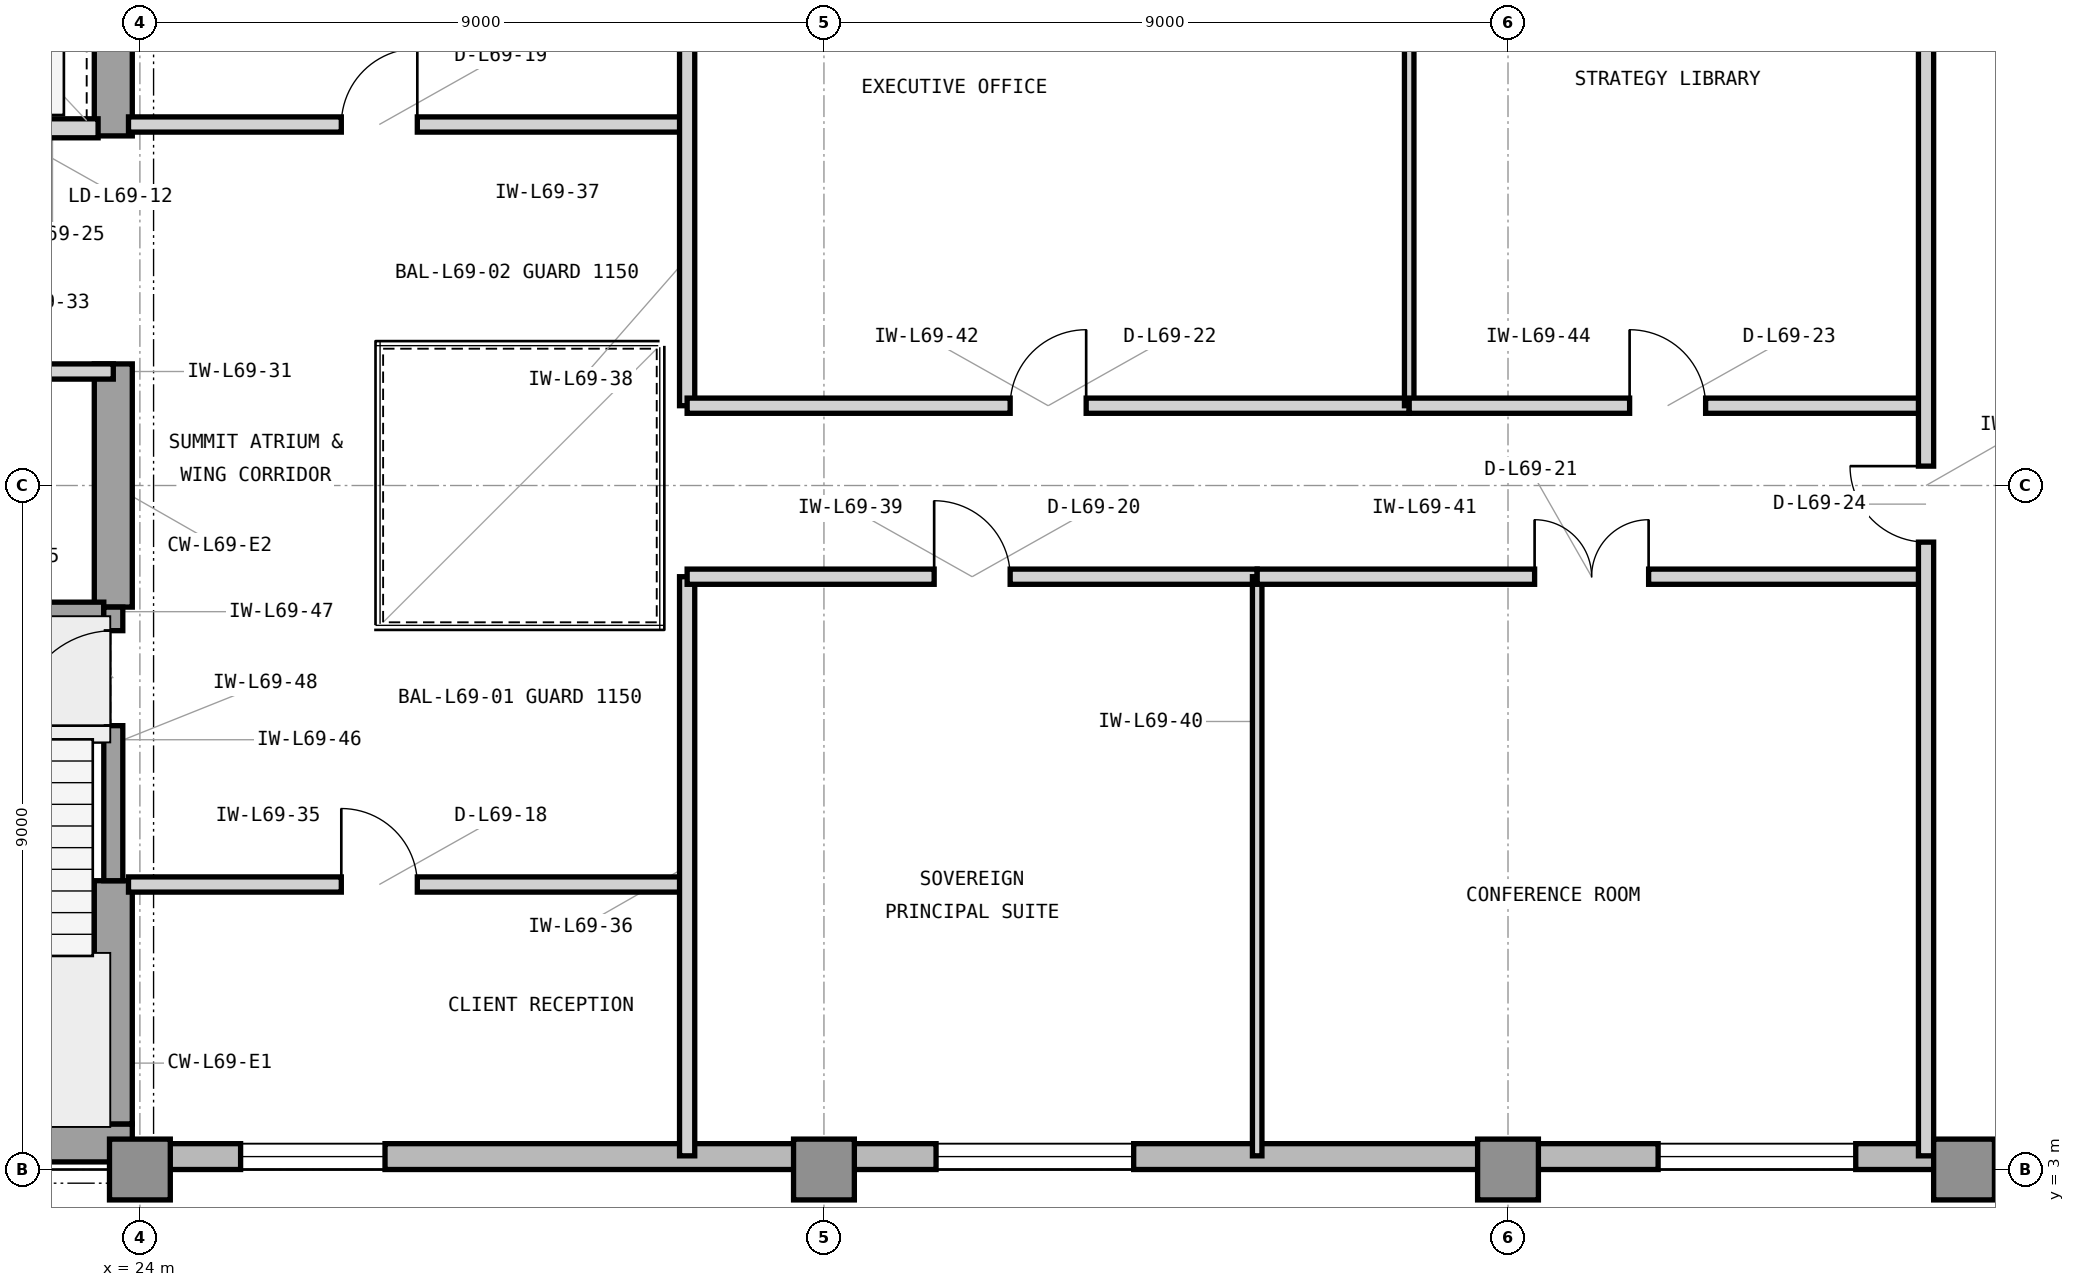
"""IFC4 building model, lengths in metres.
Left out: names, types, materials, properties, quantities, classifications, styles, units other than length and angle.
Written with IfcOpenShell. Run it as: python <this file> out.ifc"""

import sys

from ifc_helpers import new_model, si_unit, direction, frame, frame_2d, origin, origin_2d, place, context, subcontext, project, spatial, rectangle, extrude, element, fill, save


model = new_model("IFC4")
c1 = context("Model", 3, precision=1e-05, world=origin(), true_north=direction((0.0, 1.0)))
c2 = subcontext(c1, "Body", "Model", "MODEL_VIEW")
j1 = project(units=[si_unit("LENGTHUNIT", "METRE"), si_unit("PLANEANGLEUNIT", "RADIAN")], contexts=[c1])
p1 = place(None, origin())
s1 = spatial("IfcSite", under=j1, at=p1, CompositionType="ELEMENT")
p2 = place(p1, origin())
s2 = spatial("IfcBuilding", under=s1, at=p2, CompositionType="ELEMENT")
p3 = place(p2, frame((0.0, 0.0, 282.0)))
s3 = spatial("IfcBuildingStorey", under=s2, at=p3, CompositionType="ELEMENT", Elevation=282.0)
p4 = place(p3, frame((7.475, 3.35, 0.0), z_axis=(0.0, 0.0, 1.0), x_axis=(1.0, 0.0, 0.0)))
e1 = element("IfcWall", 1, at=p4, inside=s3, PredefinedType="SHEAR", context=c2, shape_type="SweptSolid", body=[
    extrude(rectangle(XDim=16.425, YDim=0.5, at=frame_2d((8.212, 0.0))), origin(), (0.0, 0.0, 1.0), 3.9),
])
p5 = place(p3, frame((23.65, 3.6, 0.0), z_axis=(0.0, 0.0, 1.0), x_axis=(0.0, 1.0, 0.0)))
e2 = element("IfcWall", 2, at=p5, inside=s3, PredefinedType="SHEAR", context=c2, shape_type="SweptSolid", body=[
    extrude(rectangle(XDim=3.2, YDim=0.5, at=frame_2d((1.6, 0.0))), origin(), (0.0, 0.0, 1.0), 3.9),
])
p6 = place(p3, frame((23.65, 10.4, 0.0), z_axis=(0.0, 0.0, 1.0), x_axis=(0.0, 1.0, 0.0)))
e3 = element("IfcWall", 3, at=p6, inside=s3, PredefinedType="SHEAR", context=c2, shape_type="SweptSolid", body=[
    extrude(rectangle(XDim=3.2, YDim=0.5, at=frame_2d((1.6, 0.0))), origin(), (0.0, 0.0, 1.0), 3.9),
])
p7 = place(p3, frame((23.65, 16.6, 0.0), z_axis=(0.0, 0.0, 1.0), x_axis=(0.0, 1.0, 0.0)))
e4 = element("IfcWall", 4, at=p7, inside=s3, PredefinedType="SHEAR", context=c2, shape_type="SweptSolid", body=[
    extrude(rectangle(XDim=4.05, YDim=0.5, at=frame_2d((2.025, 0.0))), origin(), (0.0, 0.0, 1.0), 3.9),
])
for number, where, z_axis, x_axis in (
    (5, (24.0, 3.0, 0.0), (0.0, 0.0, 1.0), (1.0, 0.0, 0.0)),
    (6, (33.0, 3.0, 0.0), (0.0, 0.0, 1.0), (1.0, 0.0, 0.0)),
    (7, (42.0, 3.0, 0.0), (0.0, 0.0, 1.0), (1.0, 0.0, 0.0)),
    (8, (48.0, 3.0, 0.0), (0.0, 0.0, 1.0), (1.0, 0.0, 0.0)),
):
    element("IfcColumn", number, at=place(p3, frame(where, z_axis=z_axis, x_axis=x_axis)), inside=s3, PredefinedType="COLUMN", context=c2, shape_type="SweptSolid", body=[
        extrude(rectangle(XDim=0.8, YDim=0.8, at=origin_2d()), origin(), (0.0, 0.0, 1.0), 3.9),
    ])
p8 = place(p3, frame((23.9, 3.17, 0.0), z_axis=(0.0, 0.0, 1.0), x_axis=(1.0, 0.0, 0.0)))
e9 = element("IfcWall", 9, at=p8, inside=s3, PredefinedType="STANDARD", context=c2, shape_type="SweptSolid", body=[
    extrude(rectangle(XDim=28.5, YDim=0.34, at=frame_2d((14.25, 0.0))), origin(), (0.0, 0.0, 1.0), 3.715),
])
p9 = place(p8, frame((1.425, 0.0, 0.8)))
e10 = element("IfcOpeningElement", 10, at=p9, cuts=e9, PredefinedType="OPENING", context=c2, shape_type="SweptSolid", body=[
    extrude(rectangle(XDim=1.9, YDim=2.35, at=frame_2d((0.95, 1.175))), frame((0.0, 0.18, 0.0), z_axis=(0.0, -1.0, 0.0), x_axis=(1.0, 0.0, 0.0)), (0.0, 0.0, 1.0), 0.36),
])
p10 = place(p8, frame((10.575, 0.0, 0.8)))
e11 = element("IfcOpeningElement", 11, at=p10, cuts=e9, PredefinedType="OPENING", context=c2, shape_type="SweptSolid", body=[
    extrude(rectangle(XDim=2.6, YDim=2.35, at=frame_2d((1.3, 1.175))), frame((0.0, 0.18, 0.0), z_axis=(0.0, -1.0, 0.0), x_axis=(1.0, 0.0, 0.0)), (0.0, 0.0, 1.0), 0.36),
])
p11 = place(p8, frame((20.075, 0.0, 0.8)))
e12 = element("IfcOpeningElement", 12, at=p11, cuts=e9, PredefinedType="OPENING", context=c2, shape_type="SweptSolid", body=[
    extrude(rectangle(XDim=2.6, YDim=2.35, at=frame_2d((1.3, 1.175))), frame((0.0, 0.18, 0.0), z_axis=(0.0, -1.0, 0.0), x_axis=(1.0, 0.0, 0.0)), (0.0, 0.0, 1.0), 0.36),
])
p12 = place(p3, frame((21.05, 16.7, 0.0), z_axis=(0.0, 0.0, 1.0), x_axis=(1.0, 0.0, 0.0)))
e13 = element("IfcWall", 13, at=p12, inside=s3, PredefinedType="PARTITIONING", context=c2, shape_type="SweptSolid", body=[
    extrude(rectangle(XDim=2.4, YDim=0.25, at=frame_2d((1.2, 0.0))), origin(), (0.0, 0.0, 1.0), 3.354),
])
p13 = place(p12, frame((0.52, 0.0, 0.0)))
e14 = element("IfcOpeningElement", 14, at=p13, cuts=e13, PredefinedType="OPENING", context=c2, shape_type="SweptSolid", body=[
    extrude(rectangle(XDim=1.15, YDim=2.25, at=frame_2d((0.575, 1.125))), frame((0.0, 0.135, 0.0), z_axis=(0.0, -1.0, 0.0), x_axis=(1.0, 0.0, 0.0)), (0.0, 0.0, 1.0), 0.27),
])
p14 = place(p3, frame((18.45, 13.5, 0.0), z_axis=(0.0, 0.0, 1.0), x_axis=(1.0, 0.0, 0.0)))
e15 = element("IfcWall", 15, at=p14, inside=s3, PredefinedType="PARTITIONING", context=c2, shape_type="SweptSolid", body=[
    extrude(rectangle(XDim=5.2, YDim=0.2, at=frame_2d((2.6, 0.0))), origin(), (0.0, 0.0, 1.0), 3.354),
])
p15 = place(p14, frame((2.125, 0.0, 0.0)))
e16 = element("IfcOpeningElement", 16, at=p15, cuts=e15, PredefinedType="OPENING", context=c2, shape_type="SweptSolid", body=[
    extrude(rectangle(XDim=0.95, YDim=2.1, at=frame_2d((0.475, 1.05))), frame((0.0, 0.11, 0.0), z_axis=(0.0, -1.0, 0.0), x_axis=(1.0, 0.0, 0.0)), (0.0, 0.0, 1.0), 0.22),
])
p16 = place(p3, frame((23.85, 6.75, 0.0), z_axis=(0.0, 0.0, 1.0), x_axis=(1.0, 0.0, 0.0)))
e17 = element("IfcWall", 17, at=p16, inside=s3, PredefinedType="PARTITIONING", context=c2, shape_type="SweptSolid", body=[
    extrude(rectangle(XDim=7.35, YDim=0.2, at=frame_2d((3.675, 0.0))), origin(), (0.0, 0.0, 1.0), 3.63),
])
p17 = place(p16, frame((2.8, 0.0, 0.0)))
e18 = element("IfcOpeningElement", 18, at=p17, cuts=e17, PredefinedType="OPENING", context=c2, shape_type="SweptSolid", body=[
    extrude(rectangle(XDim=1.0, YDim=2.15, at=frame_2d((0.5, 1.075))), frame((0.0, 0.11, 0.0), z_axis=(0.0, -1.0, 0.0), x_axis=(1.0, 0.0, 0.0)), (0.0, 0.0, 1.0), 0.22),
])
p18 = place(p3, frame((31.2, 3.18, 0.0), z_axis=(0.0, 0.0, 1.0), x_axis=(0.0, 1.0, 0.0)))
e19 = element("IfcWall", 19, at=p18, inside=s3, PredefinedType="PARTITIONING", context=c2, shape_type="SweptSolid", body=[
    extrude(rectangle(XDim=7.62, YDim=0.2, at=frame_2d((3.81, 0.0))), origin(), (0.0, 0.0, 1.0), 3.63),
])
p19 = place(p3, frame((23.85, 16.75, 0.0), z_axis=(0.0, 0.0, 1.0), x_axis=(1.0, 0.0, 0.0)))
e20 = element("IfcWall", 20, at=p19, inside=s3, PredefinedType="PARTITIONING", context=c2, shape_type="SweptSolid", body=[
    extrude(rectangle(XDim=7.35, YDim=0.2, at=frame_2d((3.675, 0.0))), origin(), (0.0, 0.0, 1.0), 3.63),
])
p20 = place(p19, frame((2.8, 0.0, 0.0)))
e21 = element("IfcOpeningElement", 21, at=p20, cuts=e20, PredefinedType="OPENING", context=c2, shape_type="SweptSolid", body=[
    extrude(rectangle(XDim=1.0, YDim=2.15, at=frame_2d((0.5, 1.075))), frame((0.0, 0.11, 0.0), z_axis=(0.0, -1.0, 0.0), x_axis=(1.0, 0.0, 0.0)), (0.0, 0.0, 1.0), 0.22),
])
p21 = place(p3, frame((31.2, 13.05, 0.0), z_axis=(0.0, 0.0, 1.0), x_axis=(0.0, 1.0, 0.0)))
e22 = element("IfcWall", 22, at=p21, inside=s3, PredefinedType="PARTITIONING", context=c2, shape_type="SweptSolid", body=[
    extrude(rectangle(XDim=7.77, YDim=0.2, at=frame_2d((3.885, 0.0))), origin(), (0.0, 0.0, 1.0), 3.63),
])
p22 = place(p3, frame((31.2, 10.8, 0.0), z_axis=(0.0, 0.0, 1.0), x_axis=(1.0, 0.0, 0.0)))
e23 = element("IfcWall", 23, at=p22, inside=s3, PredefinedType="PARTITIONING", context=c2, shape_type="SweptSolid", body=[
    extrude(rectangle(XDim=7.5, YDim=0.2, at=frame_2d((3.75, 0.0))), origin(), (0.0, 0.0, 1.0), 3.63),
])
p23 = place(p22, frame((3.25, 0.0, 0.0)))
e24 = element("IfcOpeningElement", 24, at=p23, cuts=e23, PredefinedType="OPENING", context=c2, shape_type="SweptSolid", body=[
    extrude(rectangle(XDim=1.0, YDim=2.15, at=frame_2d((0.5, 1.075))), frame((0.0, 0.11, 0.0), z_axis=(0.0, -1.0, 0.0), x_axis=(1.0, 0.0, 0.0)), (0.0, 0.0, 1.0), 0.22),
])
p24 = place(p3, frame((38.7, 3.18, 0.0), z_axis=(0.0, 0.0, 1.0), x_axis=(0.0, 1.0, 0.0)))
e25 = element("IfcWall", 25, at=p24, inside=s3, PredefinedType="PARTITIONING", context=c2, shape_type="SweptSolid", body=[
    extrude(rectangle(XDim=7.62, YDim=0.125, at=frame_2d((3.81, 0.0))), origin(), (0.0, 0.0, 1.0), 3.63),
])
p25 = place(p3, frame((38.7, 10.8, 0.0), z_axis=(0.0, 0.0, 1.0), x_axis=(1.0, 0.0, 0.0)))
e26 = element("IfcWall", 26, at=p25, inside=s3, PredefinedType="PARTITIONING", context=c2, shape_type="SweptSolid", body=[
    extrude(rectangle(XDim=8.8, YDim=0.2, at=frame_2d((4.4, 0.0))), origin(), (0.0, 0.0, 1.0), 3.63),
])
p26 = place(p25, frame((3.65, 0.0, 0.0)))
e27 = element("IfcOpeningElement", 27, at=p26, cuts=e26, PredefinedType="OPENING", context=c2, shape_type="SweptSolid", body=[
    extrude(rectangle(XDim=1.5, YDim=2.3, at=frame_2d((0.75, 1.15))), frame((0.0, 0.11, 0.0), z_axis=(0.0, -1.0, 0.0), x_axis=(1.0, 0.0, 0.0)), (0.0, 0.0, 1.0), 0.22),
])
p27 = place(p3, frame((31.2, 13.05, 0.0), z_axis=(0.0, 0.0, 1.0), x_axis=(1.0, 0.0, 0.0)))
e28 = element("IfcWall", 28, at=p27, inside=s3, PredefinedType="PARTITIONING", context=c2, shape_type="SweptSolid", body=[
    extrude(rectangle(XDim=9.5, YDim=0.2, at=frame_2d((4.75, 0.0))), origin(), (0.0, 0.0, 1.0), 3.63),
])
p28 = place(p27, frame((4.25, 0.0, 0.0)))
e29 = element("IfcOpeningElement", 29, at=p28, cuts=e28, PredefinedType="OPENING", context=c2, shape_type="SweptSolid", body=[
    extrude(rectangle(XDim=1.0, YDim=2.15, at=frame_2d((0.5, 1.075))), frame((0.0, 0.11, 0.0), z_axis=(0.0, -1.0, 0.0), x_axis=(1.0, 0.0, 0.0)), (0.0, 0.0, 1.0), 0.22),
])
p29 = place(p3, frame((40.7, 13.05, 0.0), z_axis=(0.0, 0.0, 1.0), x_axis=(0.0, 1.0, 0.0)))
e30 = element("IfcWall", 30, at=p29, inside=s3, PredefinedType="PARTITIONING", context=c2, shape_type="SweptSolid", body=[
    extrude(rectangle(XDim=7.77, YDim=0.125, at=frame_2d((3.885, 0.0))), origin(), (0.0, 0.0, 1.0), 3.63),
])
p30 = place(p3, frame((40.7, 13.05, 0.0), z_axis=(0.0, 0.0, 1.0), x_axis=(1.0, 0.0, 0.0)))
e31 = element("IfcWall", 31, at=p30, inside=s3, PredefinedType="PARTITIONING", context=c2, shape_type="SweptSolid", body=[
    extrude(rectangle(XDim=6.8, YDim=0.2, at=frame_2d((3.4, 0.0))), origin(), (0.0, 0.0, 1.0), 3.63),
])
p31 = place(p30, frame((2.9, 0.0, 0.0)))
e32 = element("IfcOpeningElement", 32, at=p31, cuts=e31, PredefinedType="OPENING", context=c2, shape_type="SweptSolid", body=[
    extrude(rectangle(XDim=1.0, YDim=2.15, at=frame_2d((0.5, 1.075))), frame((0.0, 0.11, 0.0), z_axis=(0.0, -1.0, 0.0), x_axis=(1.0, 0.0, 0.0)), (0.0, 0.0, 1.0), 0.22),
])
p32 = place(p3, frame((47.5, 3.18, 0.0), z_axis=(0.0, 0.0, 1.0), x_axis=(0.0, 1.0, 0.0)))
e33 = element("IfcWall", 33, at=p32, inside=s3, PredefinedType="PARTITIONING", context=c2, shape_type="SweptSolid", body=[
    extrude(rectangle(XDim=17.64, YDim=0.2, at=frame_2d((8.82, 0.0))), origin(), (0.0, 0.0, 1.0), 3.63),
])
p33 = place(p32, frame((8.075, 0.0, 0.0)))
e34 = element("IfcOpeningElement", 34, at=p33, cuts=e33, PredefinedType="OPENING", context=c2, shape_type="SweptSolid", body=[
    extrude(rectangle(XDim=1.0, YDim=2.15, at=frame_2d((0.5, 1.075))), frame((0.0, 0.11, 0.0), z_axis=(0.0, -1.0, 0.0), x_axis=(1.0, 0.0, 0.0)), (0.0, 0.0, 1.0), 0.22),
])
p34 = place(p3, frame((19.705, 10.34, 0.0), z_axis=(0.0, 0.0, 1.0), x_axis=(1.0, 0.0, 0.0)))
e35 = element("IfcWall", 35, at=p34, inside=s3, PredefinedType="SHEAR", context=c2, shape_type="SweptSolid", body=[
    extrude(rectangle(XDim=3.82, YDim=0.25, at=frame_2d((1.91, 0.0))), origin(), (0.0, 0.0, 1.0), 3.9),
])
p35 = place(p3, frame((23.65, 6.8, 0.0), z_axis=(0.0, 0.0, 1.0), x_axis=(0.0, 1.0, 0.0)))
e36 = element("IfcWall", 36, at=p35, inside=s3, PredefinedType="SHEAR", context=c2, shape_type="SweptSolid", body=[
    extrude(rectangle(XDim=3.6, YDim=0.25, at=frame_2d((1.8, 0.0))), origin(), (0.0, 0.0, 1.0), 3.9),
])
p36 = place(p35, frame((2.04, 0.0, 0.0)))
e37 = element("IfcOpeningElement", 37, at=p36, cuts=e36, PredefinedType="OPENING", context=c2, shape_type="SweptSolid", body=[
    extrude(rectangle(XDim=1.25, YDim=2.2, at=frame_2d((0.625, 1.1))), frame((0.0, 0.135, 0.0), z_axis=(0.0, -1.0, 0.0), x_axis=(1.0, 0.0, 0.0)), (0.0, 0.0, 1.0), 0.27),
])
p37 = place(p9, origin())
e38 = element("IfcWindow", 38, at=p37, inside=s3, PartitioningType="SINGLE_PANEL", PredefinedType="WINDOW", context=c2, shape_type="SweptSolid", body=[
    extrude(rectangle(XDim=1.9, YDim=2.35, at=frame_2d((0.95, 1.175))), frame((0.0, 0.11, 0.0), z_axis=(0.0, -1.0, 0.0), x_axis=(1.0, 0.0, 0.0)), (0.0, 0.0, 1.0), 0.06),
])
fill(e10, e38)
p38 = place(p10, origin())
e39 = element("IfcWindow", 39, at=p38, inside=s3, PartitioningType="SINGLE_PANEL", PredefinedType="WINDOW", context=c2, shape_type="SweptSolid", body=[
    extrude(rectangle(XDim=2.6, YDim=2.35, at=frame_2d((1.3, 1.175))), frame((0.0, 0.11, 0.0), z_axis=(0.0, -1.0, 0.0), x_axis=(1.0, 0.0, 0.0)), (0.0, 0.0, 1.0), 0.06),
])
fill(e11, e39)
p39 = place(p11, origin())
e40 = element("IfcWindow", 40, at=p39, inside=s3, PartitioningType="SINGLE_PANEL", PredefinedType="WINDOW", context=c2, shape_type="SweptSolid", body=[
    extrude(rectangle(XDim=2.6, YDim=2.35, at=frame_2d((1.3, 1.175))), frame((0.0, 0.11, 0.0), z_axis=(0.0, -1.0, 0.0), x_axis=(1.0, 0.0, 0.0)), (0.0, 0.0, 1.0), 0.06),
])
fill(e12, e40)
p40 = place(p17, origin())
e41 = element("IfcDoor", 41, at=p40, inside=s3, OperationType="SINGLE_SWING_LEFT", PredefinedType="DOOR", context=c2, shape_type="SweptSolid", body=[
    extrude(rectangle(XDim=1.0, YDim=2.15, at=frame_2d((0.5, 1.075))), frame((0.0, 0.025, 0.0), z_axis=(0.0, -1.0, 0.0), x_axis=(1.0, 0.0, 0.0)), (0.0, 0.0, 1.0), 0.05),
])
fill(e18, e41)
p41 = place(p20, origin())
e42 = element("IfcDoor", 42, at=p41, inside=s3, OperationType="SINGLE_SWING_RIGHT", PredefinedType="DOOR", context=c2, shape_type="SweptSolid", body=[
    extrude(rectangle(XDim=1.0, YDim=2.15, at=frame_2d((0.5, 1.075))), frame((0.0, 0.025, 0.0), z_axis=(0.0, -1.0, 0.0), x_axis=(1.0, 0.0, 0.0)), (0.0, 0.0, 1.0), 0.05),
])
fill(e21, e42)
p42 = place(p23, origin())
e43 = element("IfcDoor", 43, at=p42, inside=s3, OperationType="SINGLE_SWING_LEFT", PredefinedType="DOOR", context=c2, shape_type="SweptSolid", body=[
    extrude(rectangle(XDim=1.0, YDim=2.15, at=frame_2d((0.5, 1.075))), frame((0.0, 0.025, 0.0), z_axis=(0.0, -1.0, 0.0), x_axis=(1.0, 0.0, 0.0)), (0.0, 0.0, 1.0), 0.05),
])
fill(e24, e43)
p43 = place(p26, origin())
e44 = element("IfcDoor", 44, at=p43, inside=s3, OperationType="DOUBLE_DOOR_SINGLE_SWING", PredefinedType="DOOR", context=c2, shape_type="SweptSolid", body=[
    extrude(rectangle(XDim=1.5, YDim=2.3, at=frame_2d((0.75, 1.15))), frame((0.0, 0.025, 0.0), z_axis=(0.0, -1.0, 0.0), x_axis=(1.0, 0.0, 0.0)), (0.0, 0.0, 1.0), 0.05),
])
fill(e27, e44)
p44 = place(p28, origin())
e45 = element("IfcDoor", 45, at=p44, inside=s3, OperationType="SINGLE_SWING_RIGHT", PredefinedType="DOOR", context=c2, shape_type="SweptSolid", body=[
    extrude(rectangle(XDim=1.0, YDim=2.15, at=frame_2d((0.5, 1.075))), frame((0.0, 0.025, 0.0), z_axis=(0.0, -1.0, 0.0), x_axis=(1.0, 0.0, 0.0)), (0.0, 0.0, 1.0), 0.05),
])
fill(e29, e45)
p45 = place(p31, origin())
e46 = element("IfcDoor", 46, at=p45, inside=s3, OperationType="SINGLE_SWING_LEFT", PredefinedType="DOOR", context=c2, shape_type="SweptSolid", body=[
    extrude(rectangle(XDim=1.0, YDim=2.15, at=frame_2d((0.5, 1.075))), frame((0.0, 0.025, 0.0), z_axis=(0.0, -1.0, 0.0), x_axis=(1.0, 0.0, 0.0)), (0.0, 0.0, 1.0), 0.05),
])
fill(e32, e46)
p46 = place(p33, origin())
e47 = element("IfcDoor", 47, at=p46, inside=s3, OperationType="SINGLE_SWING_RIGHT", PredefinedType="DOOR", context=c2, shape_type="SweptSolid", body=[
    extrude(rectangle(XDim=1.0, YDim=2.15, at=frame_2d((0.5, 1.075))), frame((0.0, 0.025, 0.0), z_axis=(0.0, -1.0, 0.0), x_axis=(1.0, 0.0, 0.0)), (0.0, 0.0, 1.0), 0.05),
])
fill(e34, e47)
p47 = place(p36, origin())
e48 = element("IfcDoor", 48, at=p47, inside=s3, OperationType="SINGLE_SWING_LEFT", PredefinedType="DOOR", context=c2, shape_type="SweptSolid", body=[
    extrude(rectangle(XDim=1.25, YDim=2.2, at=frame_2d((0.625, 1.1))), frame((0.0, 0.025, 0.0), z_axis=(0.0, -1.0, 0.0), x_axis=(1.0, 0.0, 0.0)), (0.0, 0.0, 1.0), 0.05),
])
fill(e37, e48)
save(model, sys.argv[1])
